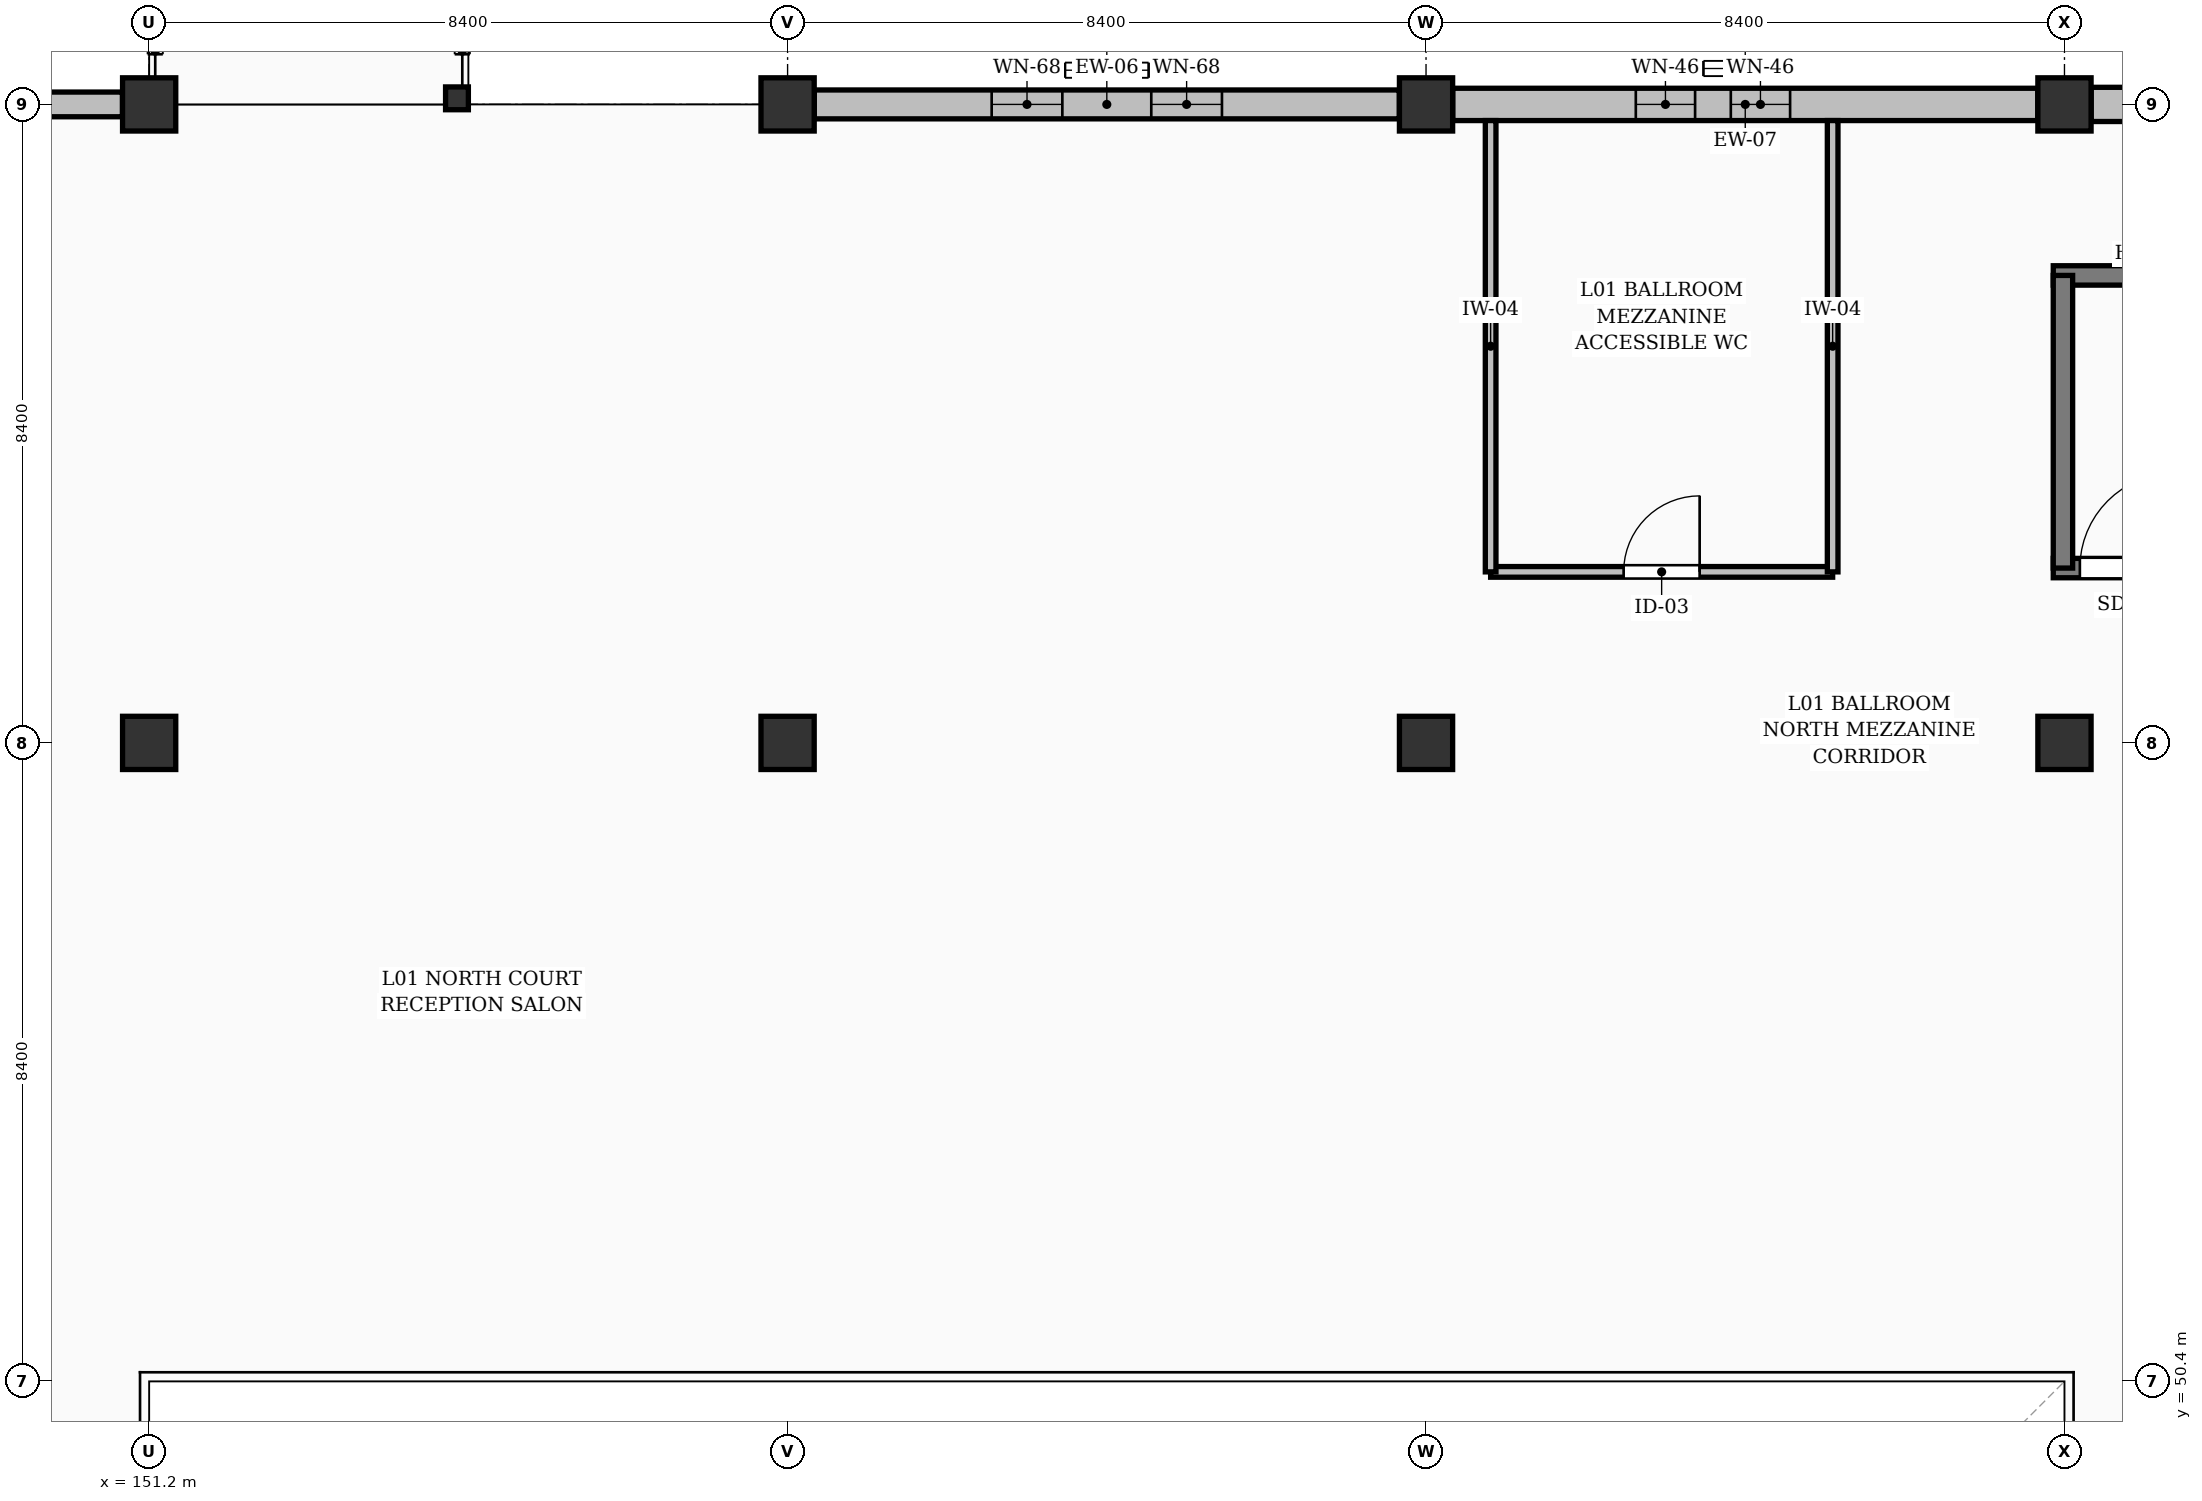
"""IFC4 building model, lengths in metres.
Left out: names, types, materials, properties, quantities, classifications, styles, units other than length and angle.
Written with IfcOpenShell. Run it as: python <this file> out.ifc"""

import sys

from ifc_helpers import new_model, si_unit, direction, frame, frame_2d, origin, origin_2d, place, context, subcontext, project, spatial, rectangle, hollow_rectangle, extrude, element, fill, save


model = new_model("IFC4")
c1 = context("Model", 3, precision=1e-05, world=origin(), true_north=direction((0.0, 1.0)))
c2 = subcontext(c1, "Body", "Model", "MODEL_VIEW")
j1 = project(units=[si_unit("LENGTHUNIT", "METRE"), si_unit("PLANEANGLEUNIT", "RADIAN")], contexts=[c1])
p1 = place(None, origin())
s1 = spatial("IfcSite", under=j1, at=p1, CompositionType="ELEMENT")
p2 = place(p1, origin())
s2 = spatial("IfcBuilding", under=s1, at=p2, CompositionType="ELEMENT")
p3 = place(p2, frame((0.0, 0.0, 3.92)))
s3 = spatial("IfcBuildingStorey", under=s2, at=p3, CompositionType="ELEMENT", Elevation=3.92)
for number, where, z_axis, x_axis in (
    (1, (151.2, 58.8, 0.0), (0.0, 0.0, 1.0), (1.0, 0.0, 0.0)),
    (2, (151.2, 67.2, 0.0), (0.0, 0.0, 1.0), (1.0, 0.0, 0.0)),
    (3, (159.6, 58.8, 0.0), (0.0, 0.0, 1.0), (1.0, 0.0, 0.0)),
    (4, (159.6, 67.2, 0.0), (0.0, 0.0, 1.0), (1.0, 0.0, 0.0)),
    (5, (168.0, 58.8, 0.0), (0.0, 0.0, 1.0), (1.0, 0.0, 0.0)),
    (6, (168.0, 67.2, 0.0), (0.0, 0.0, 1.0), (1.0, 0.0, 0.0)),
    (7, (176.4, 58.8, 0.0), (0.0, 0.0, 1.0), (1.0, 0.0, 0.0)),
    (8, (176.4, 67.2, 0.0), (0.0, 0.0, 1.0), (1.0, 0.0, 0.0)),
):
    element("IfcColumn", number, at=place(p3, frame(where, z_axis=z_axis, x_axis=x_axis)), inside=s3, PredefinedType="COLUMN", context=c2, shape_type="SweptSolid", body=[
        extrude(rectangle(XDim=0.7, YDim=0.7, at=origin_2d()), origin(), (0.0, 0.0, 1.0), 3.64),
    ])
p4 = place(p3, frame((155.25, 67.28, 0.0), z_axis=(0.0, 0.0, 1.0), x_axis=(1.0, 0.0, 0.0)))
e9 = element("IfcColumn", 9, at=p4, inside=s3, PredefinedType="COLUMN", context=c2, shape_type="SweptSolid", body=[
    extrude(hollow_rectangle(XDim=0.3, YDim=0.3, WallThickness=0.016, at=origin_2d()), origin(), (0.0, 0.0, 1.0), 3.64),
])
p5 = place(p3, frame((143.151, 67.2, 0.0), z_axis=(0.0, 0.0, 1.0), x_axis=(1.0, 0.0, 0.0)))
e10 = element("IfcWall", 10, at=p5, inside=s3, PredefinedType="SOLIDWALL", context=c2, shape_type="SweptSolid", body=[
    extrude(rectangle(XDim=7.698, YDim=0.325, at=frame_2d((3.849, 0.0))), origin(), (0.0, 0.0, 1.0), 2.445),
])
p6 = place(p5, frame((2.309, 0.0, 0.3)))
e11 = element("IfcOpeningElement", 11, at=p6, cuts=e10, PredefinedType="OPENING", context=c2, shape_type="SweptSolid", body=[
    extrude(rectangle(XDim=0.98, YDim=1.75, at=frame_2d((0.49, 0.875))), frame((0.0, 0.172, 0.0), z_axis=(0.0, -1.0, 0.0), x_axis=(1.0, 0.0, 0.0)), (0.0, 0.0, 1.0), 0.345),
])
p7 = place(p5, frame((4.409, 0.0, 0.3)))
e12 = element("IfcOpeningElement", 12, at=p7, cuts=e10, PredefinedType="OPENING", context=c2, shape_type="SweptSolid", body=[
    extrude(rectangle(XDim=0.98, YDim=1.75, at=frame_2d((0.49, 0.875))), frame((0.0, 0.172, 0.0), z_axis=(0.0, -1.0, 0.0), x_axis=(1.0, 0.0, 0.0)), (0.0, 0.0, 1.0), 0.345),
])
p8 = place(p3, frame((159.951, 67.2, 0.0), z_axis=(0.0, 0.0, 1.0), x_axis=(1.0, 0.0, 0.0)))
e13 = element("IfcWall", 13, at=p8, inside=s3, PredefinedType="SOLIDWALL", context=c2, shape_type="SweptSolid", body=[
    extrude(rectangle(XDim=7.698, YDim=0.38, at=frame_2d((3.849, 0.0))), origin(), (0.0, 0.0, 1.0), 2.445),
])
p9 = place(p8, frame((2.334, 0.0, 0.3)))
e14 = element("IfcOpeningElement", 14, at=p9, cuts=e13, PredefinedType="OPENING", context=c2, shape_type="SweptSolid", body=[
    extrude(rectangle(XDim=0.93, YDim=1.9, at=frame_2d((0.465, 0.95))), frame((0.0, 0.2, 0.0), z_axis=(0.0, -1.0, 0.0), x_axis=(1.0, 0.0, 0.0)), (0.0, 0.0, 1.0), 0.4),
])
p10 = place(p8, frame((4.434, 0.0, 0.3)))
e15 = element("IfcOpeningElement", 15, at=p10, cuts=e13, PredefinedType="OPENING", context=c2, shape_type="SweptSolid", body=[
    extrude(rectangle(XDim=0.93, YDim=1.9, at=frame_2d((0.465, 0.95))), frame((0.0, 0.2, 0.0), z_axis=(0.0, -1.0, 0.0), x_axis=(1.0, 0.0, 0.0)), (0.0, 0.0, 1.0), 0.4),
])
p11 = place(p3, frame((168.351, 67.2, 0.0), z_axis=(0.0, 0.0, 1.0), x_axis=(1.0, 0.0, 0.0)))
e16 = element("IfcWall", 16, at=p11, inside=s3, PredefinedType="SOLIDWALL", context=c2, shape_type="SweptSolid", body=[
    extrude(rectangle(XDim=7.698, YDim=0.425, at=frame_2d((3.849, 0.0))), origin(), (0.0, 0.0, 1.0), 2.445),
])
p12 = place(p11, frame((2.409, 0.0, 0.3)))
e17 = element("IfcOpeningElement", 17, at=p12, cuts=e16, PredefinedType="OPENING", context=c2, shape_type="SweptSolid", body=[
    extrude(rectangle(XDim=0.78, YDim=1.85, at=frame_2d((0.39, 0.925))), frame((0.0, 0.223, 0.0), z_axis=(0.0, -1.0, 0.0), x_axis=(1.0, 0.0, 0.0)), (0.0, 0.0, 1.0), 0.445),
])
p13 = place(p11, frame((3.659, 0.0, 0.3)))
e18 = element("IfcOpeningElement", 18, at=p13, cuts=e16, PredefinedType="OPENING", context=c2, shape_type="SweptSolid", body=[
    extrude(rectangle(XDim=0.78, YDim=1.85, at=frame_2d((0.39, 0.925))), frame((0.0, 0.223, 0.0), z_axis=(0.0, -1.0, 0.0), x_axis=(1.0, 0.0, 0.0)), (0.0, 0.0, 1.0), 0.445),
])
p14 = place(p3, frame((176.751, 67.2, 0.0), z_axis=(0.0, 0.0, 1.0), x_axis=(1.0, 0.0, 0.0)))
e19 = element("IfcWall", 19, at=p14, inside=s3, PredefinedType="SOLIDWALL", context=c2, shape_type="SweptSolid", body=[
    extrude(rectangle(XDim=7.698, YDim=0.45, at=frame_2d((3.849, 0.0))), origin(), (0.0, 0.0, 1.0), 2.445),
])
p15 = place(p14, frame((2.419, 0.0, 0.3)))
e20 = element("IfcOpeningElement", 20, at=p15, cuts=e19, PredefinedType="OPENING", context=c2, shape_type="SweptSolid", body=[
    extrude(rectangle(XDim=0.76, YDim=1.75, at=frame_2d((0.38, 0.875))), frame((0.0, 0.235, 0.0), z_axis=(0.0, -1.0, 0.0), x_axis=(1.0, 0.0, 0.0)), (0.0, 0.0, 1.0), 0.47),
])
p16 = place(p14, frame((4.519, 0.0, 0.3)))
e21 = element("IfcOpeningElement", 21, at=p16, cuts=e19, PredefinedType="OPENING", context=c2, shape_type="SweptSolid", body=[
    extrude(rectangle(XDim=0.76, YDim=1.75, at=frame_2d((0.38, 0.875))), frame((0.0, 0.235, 0.0), z_axis=(0.0, -1.0, 0.0), x_axis=(1.0, 0.0, 0.0)), (0.0, 0.0, 1.0), 0.47),
])
p17 = place(p3, frame((176.252, 61.1, 0.0), z_axis=(0.0, 0.0, 1.0), x_axis=(1.0, 0.0, 0.0)))
e22 = element("IfcWall", 22, at=p17, inside=s3, PredefinedType="SOLIDWALL", context=c2, shape_type="SweptSolid", body=[
    extrude(rectangle(XDim=8.225, YDim=0.255, at=frame_2d((4.113, 0.0))), origin(), (0.0, 0.0, 1.0), 3.36),
])
p18 = place(p17, frame((0.35, 0.0, 0.0)))
e23 = element("IfcOpeningElement", 23, at=p18, cuts=e22, PredefinedType="OPENING", context=c2, shape_type="SweptSolid", body=[
    extrude(rectangle(XDim=1.25, YDim=2.2, at=frame_2d((0.625, 1.1))), frame((0.0, 0.137, 0.0), z_axis=(0.0, -1.0, 0.0), x_axis=(1.0, 0.0, 0.0)), (0.0, 0.0, 1.0), 0.275),
])
p19 = place(p3, frame((176.252, 64.95, 0.0), z_axis=(0.0, 0.0, 1.0), x_axis=(1.0, 0.0, 0.0)))
e24 = element("IfcWall", 24, at=p19, inside=s3, PredefinedType="SOLIDWALL", context=c2, shape_type="SweptSolid", body=[
    extrude(rectangle(XDim=8.225, YDim=0.255, at=frame_2d((4.113, 0.0))), origin(), (0.0, 0.0, 1.0), 3.36),
])
p20 = place(p3, frame((176.38, 61.1, 0.0), z_axis=(0.0, 0.0, 1.0), x_axis=(0.0, 1.0, 0.0)))
e25 = element("IfcWall", 25, at=p20, inside=s3, PredefinedType="SOLIDWALL", context=c2, shape_type="SweptSolid", body=[
    extrude(rectangle(XDim=3.85, YDim=0.255, at=frame_2d((1.925, 0.0))), origin(), (0.0, 0.0, 1.0), 3.36),
])
p21 = place(p3, frame((168.85, 61.05, 0.0), z_axis=(0.0, 0.0, 1.0), x_axis=(1.0, 0.0, 0.0)))
e26 = element("IfcWall", 26, at=p21, inside=s3, PredefinedType="PARTITIONING", context=c2, shape_type="SweptSolid", body=[
    extrude(rectangle(XDim=4.5, YDim=0.14, at=frame_2d((2.25, 0.0))), origin(), (0.0, 0.0, 1.0), 3.36),
])
p22 = place(p21, frame((1.75, 0.0, 0.0)))
e27 = element("IfcOpeningElement", 27, at=p22, cuts=e26, PredefinedType="OPENING", context=c2, shape_type="SweptSolid", body=[
    extrude(rectangle(XDim=1.0, YDim=2.1, at=frame_2d((0.5, 1.05))), frame((0.0, 0.08, 0.0), z_axis=(0.0, -1.0, 0.0), x_axis=(1.0, 0.0, 0.0)), (0.0, 0.0, 1.0), 0.16),
])
for number, where, z_axis, x_axis in (
    (28, (168.85, 61.05, 0.0), (0.0, 0.0, 1.0), (0.0, 1.0, 0.0)),
    (29, (173.35, 61.05, 0.0), (0.0, 0.0, 1.0), (0.0, 1.0, 0.0)),
):
    element("IfcWall", number, at=place(p3, frame(where, z_axis=z_axis, x_axis=x_axis)), inside=s3, PredefinedType="PARTITIONING", context=c2, shape_type="SweptSolid", body=[
        extrude(rectangle(XDim=5.938, YDim=0.14, at=frame_2d((2.969, 0.0))), origin(), (0.0, 0.0, 1.0), 3.36),
    ])
p23 = place(p9, origin())
e30 = element("IfcWindow", 30, at=p23, inside=s3, PartitioningType="SINGLE_PANEL", PredefinedType="WINDOW", context=c2, shape_type="SweptSolid", body=[
    extrude(rectangle(XDim=0.93, YDim=1.9, at=frame_2d((0.465, 0.95))), frame((0.0, 0.03, 0.0), z_axis=(0.0, -1.0, 0.0), x_axis=(1.0, 0.0, 0.0)), (0.0, 0.0, 1.0), 0.06),
])
fill(e14, e30)
p24 = place(p10, origin())
e31 = element("IfcWindow", 31, at=p24, inside=s3, PartitioningType="SINGLE_PANEL", PredefinedType="WINDOW", context=c2, shape_type="SweptSolid", body=[
    extrude(rectangle(XDim=0.93, YDim=1.9, at=frame_2d((0.465, 0.95))), frame((0.0, 0.03, 0.0), z_axis=(0.0, -1.0, 0.0), x_axis=(1.0, 0.0, 0.0)), (0.0, 0.0, 1.0), 0.06),
])
fill(e15, e31)
p25 = place(p12, origin())
e32 = element("IfcWindow", 32, at=p25, inside=s3, PartitioningType="SINGLE_PANEL", PredefinedType="WINDOW", context=c2, shape_type="SweptSolid", body=[
    extrude(rectangle(XDim=0.78, YDim=1.85, at=frame_2d((0.39, 0.925))), frame((0.0, 0.03, 0.0), z_axis=(0.0, -1.0, 0.0), x_axis=(1.0, 0.0, 0.0)), (0.0, 0.0, 1.0), 0.06),
])
fill(e17, e32)
p26 = place(p13, origin())
e33 = element("IfcWindow", 33, at=p26, inside=s3, PartitioningType="SINGLE_PANEL", PredefinedType="WINDOW", context=c2, shape_type="SweptSolid", body=[
    extrude(rectangle(XDim=0.78, YDim=1.85, at=frame_2d((0.39, 0.925))), frame((0.0, 0.03, 0.0), z_axis=(0.0, -1.0, 0.0), x_axis=(1.0, 0.0, 0.0)), (0.0, 0.0, 1.0), 0.06),
])
fill(e18, e33)
p27 = place(p18, origin())
e34 = element("IfcDoor", 34, at=p27, inside=s3, OperationType="SINGLE_SWING_RIGHT", PredefinedType="DOOR", context=c2, shape_type="SweptSolid", body=[
    extrude(rectangle(XDim=1.25, YDim=2.2, at=frame_2d((0.625, 1.1))), frame((0.0, 0.025, 0.0), z_axis=(0.0, -1.0, 0.0), x_axis=(1.0, 0.0, 0.0)), (0.0, 0.0, 1.0), 0.05),
])
fill(e23, e34)
p28 = place(p22, origin())
e35 = element("IfcDoor", 35, at=p28, inside=s3, OperationType="SINGLE_SWING_RIGHT", PredefinedType="DOOR", context=c2, shape_type="SweptSolid", body=[
    extrude(rectangle(XDim=1.0, YDim=2.1, at=frame_2d((0.5, 1.05))), frame((0.0, 0.025, 0.0), z_axis=(0.0, -1.0, 0.0), x_axis=(1.0, 0.0, 0.0)), (0.0, 0.0, 1.0), 0.05),
])
fill(e27, e35)
save(model, sys.argv[1])
